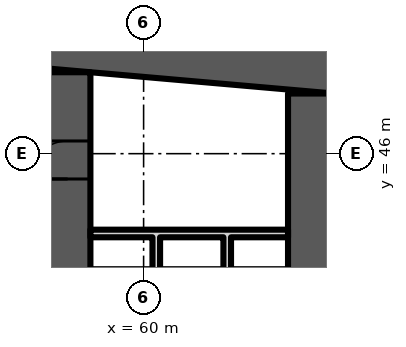
"""IFC4 building model, lengths in metres.
Left out: names, types, materials, properties, quantities, classifications, styles, units other than length and angle.
Written with IfcOpenShell. Run it as: python <this file> out.ifc"""

import sys

from ifc_helpers import new_model, si_unit, direction, frame, frame_2d, origin, place, context, subcontext, project, spatial, polyline, rectangle, outline, extrude, element, fill, save


model = new_model("IFC4")
c1 = context("Model", 3, precision=1e-05, world=origin(), true_north=direction((0.0, 1.0)))
c2 = subcontext(c1, "Body", "Model", "MODEL_VIEW")
j1 = project(units=[si_unit("LENGTHUNIT", "METRE"), si_unit("PLANEANGLEUNIT", "RADIAN")], contexts=[c1])
p1 = place(None, origin())
s1 = spatial("IfcSite", under=j1, at=p1, CompositionType="ELEMENT")
p2 = place(p1, origin())
s2 = spatial("IfcBuilding", under=s1, at=p2, CompositionType="ELEMENT")
p3 = place(p2, frame((0.0, 0.0, 48.7)))
s3 = spatial("IfcBuildingStorey", under=s2, at=p3, CompositionType="ELEMENT", Elevation=48.7)
p4 = place(p3, origin())
e1 = element("IfcWall", 1, at=p4, inside=s3, PredefinedType="SHEAR", context=c2, shape_type="SweptSolid", body=[
    extrude(outline(polyline([(9.0, 47.583), (37.0, 50.032), (65.0, 47.583), (65.0, 48.787), (37.0, 51.237), (9.0, 48.787), (9.0, 47.583)])), origin(), (0.0, 0.0, 1.0), 3.6),
])
p5 = place(p3, frame((58.0, 35.2, 0.0), z_axis=(0.0, 0.0, 1.0), x_axis=(0.0, 1.0, 0.0)))
e2 = element("IfcWall", 2, at=p5, inside=s3, PredefinedType="SHEAR", context=c2, shape_type="SweptSolid", body=[
    extrude(rectangle(XDim=12.943, YDim=1.2, at=frame_2d((6.471, 0.0))), origin(), (0.0, 0.0, 1.0), 3.6),
])
p6 = place(p5, frame((10.134, 0.0, 0.0)))
e3 = element("IfcOpeningElement", 3, at=p6, cuts=e2, PredefinedType="OPENING", context=c2, shape_type="SweptSolid", body=[
    extrude(rectangle(XDim=1.0, YDim=2.1, at=frame_2d((0.5, 1.05))), frame((0.0, 0.61, 0.0), z_axis=(0.0, -1.0, 0.0), x_axis=(1.0, 0.0, 0.0)), (0.0, 0.0, 1.0), 1.22),
])
p7 = place(p5, frame((3.2, 0.0, 0.0)))
e4 = element("IfcOpeningElement", 4, at=p7, cuts=e2, PredefinedType="OPENING", context=c2, shape_type="SweptSolid", body=[
    extrude(rectangle(XDim=1.1, YDim=2.1, at=frame_2d((0.55, 1.05))), frame((0.0, 0.61, 0.0), z_axis=(0.0, -1.0, 0.0), x_axis=(1.0, 0.0, 0.0)), (0.0, 0.0, 1.0), 1.22),
])
p8 = place(p3, frame((64.4, 35.2, 0.0), z_axis=(0.0, 0.0, 1.0), x_axis=(0.0, 1.0, 0.0)))
e5 = element("IfcWall", 5, at=p8, inside=s3, PredefinedType="SHEAR", context=c2, shape_type="SweptSolid", body=[
    extrude(rectangle(XDim=12.383, YDim=1.2, at=frame_2d((6.191, 0.0))), origin(), (0.0, 0.0, 1.0), 3.6),
])
p9 = place(p3, frame((0.0, 0.0, -0.0)))
e6 = element("IfcWall", 6, at=p9, inside=s3, PredefinedType="PARTITIONING", context=c2, shape_type="SweptSolid", body=[
    extrude(outline(polyline([(60.433, 40.8), (60.233, 40.8), (60.233, 43.8), (58.6, 43.8), (58.6, 44.0), (63.8, 44.0), (63.8, 43.8), (62.3, 43.8), (62.3, 40.8), (62.1, 40.8), (62.1, 43.8), (60.433, 43.8), (60.433, 40.8)])), origin(), (0.0, 0.0, 1.0), 3.2),
])
p10 = place(p6, origin())
e7 = element("IfcDoor", 7, at=p10, inside=s3, OperationType="SINGLE_SWING_LEFT", PredefinedType="DOOR", context=c2, shape_type="SweptSolid", body=[
    extrude(rectangle(XDim=1.0, YDim=2.1, at=frame_2d((0.5, 1.05))), frame((0.0, 0.6, 0.0), z_axis=(0.0, -1.0, 0.0), x_axis=(1.0, 0.0, 0.0)), (0.0, 0.0, 1.0), 1.199),
])
fill(e3, e7)
save(model, sys.argv[1])
